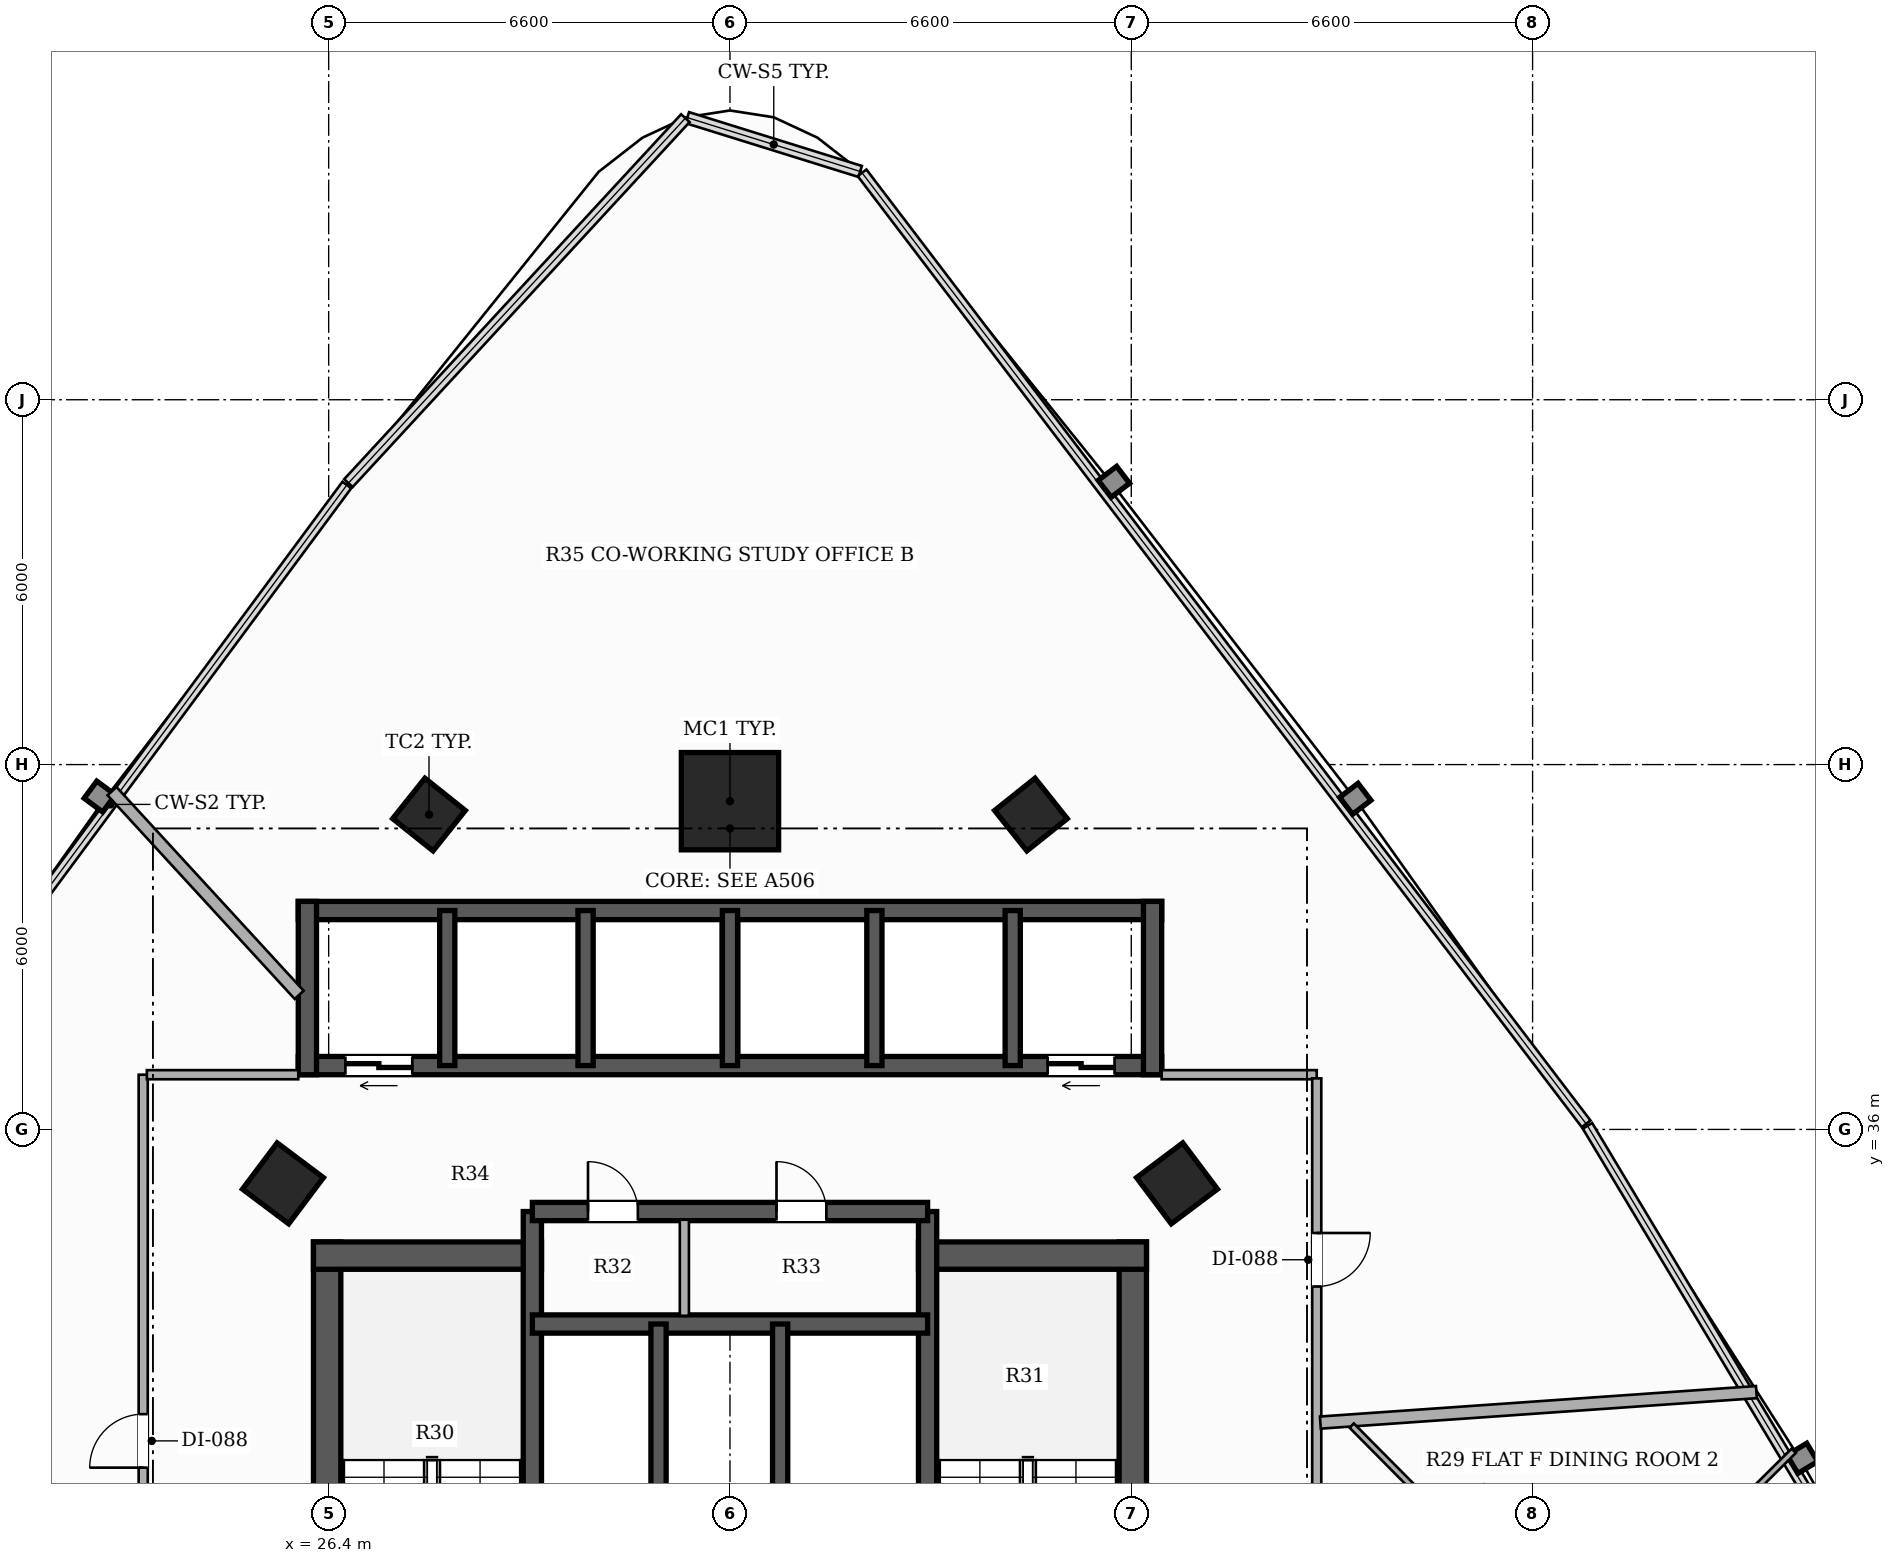
"""IFC4 building model, lengths in metres.
Left out: names, types, materials, properties, quantities, classifications, styles, units other than length and angle.
Written with IfcOpenShell. Run it as: python <this file> out.ifc"""

import sys

from ifc_helpers import new_model, si_unit, direction, frame, frame_2d, origin, origin_2d, place, context, subcontext, project, spatial, rectangle, hollow_rectangle, extrude, element, fill, save


model = new_model("IFC4")
c1 = context("Model", 3, precision=1e-05, world=origin(), true_north=direction((0.0, 1.0)))
c2 = subcontext(c1, "Body", "Model", "MODEL_VIEW")
j1 = project(units=[si_unit("LENGTHUNIT", "METRE"), si_unit("PLANEANGLEUNIT", "RADIAN")], contexts=[c1])
p1 = place(None, origin())
s1 = spatial("IfcSite", under=j1, at=p1, CompositionType="ELEMENT")
p2 = place(p1, origin())
s2 = spatial("IfcBuilding", under=s1, at=p2, CompositionType="ELEMENT")
p3 = place(p2, frame((0.0, 0.0, 30.2)))
s3 = spatial("IfcBuildingStorey", under=s2, at=p3, CompositionType="ELEMENT", Elevation=30.2)
p4 = place(p3, frame((26.375, 26.45, 0.0), z_axis=(0.0, 0.0, 1.0), x_axis=(0.0, 1.0, 0.0)))
e1 = element("IfcWall", 1, at=p4, inside=s3, PredefinedType="SHEAR", context=c2, shape_type="SweptSolid", body=[
    extrude(rectangle(XDim=7.7, YDim=0.45, at=frame_2d((3.85, 0.0))), origin(), (0.0, 0.0, 1.0), 3.3),
])
p5 = place(p3, frame((26.15, 33.925, 0.0), z_axis=(0.0, 0.0, 1.0), x_axis=(1.0, 0.0, 0.0)))
e2 = element("IfcWall", 2, at=p5, inside=s3, PredefinedType="SHEAR", context=c2, shape_type="SweptSolid", body=[
    extrude(rectangle(XDim=3.75, YDim=0.45, at=frame_2d((1.875, 0.0))), origin(), (0.0, 0.0, 1.0), 3.3),
])
p6 = place(p3, frame((39.625, 26.45, 0.0), z_axis=(0.0, 0.0, 1.0), x_axis=(0.0, 1.0, 0.0)))
e3 = element("IfcWall", 3, at=p6, inside=s3, PredefinedType="SHEAR", context=c2, shape_type="SweptSolid", body=[
    extrude(rectangle(XDim=7.7, YDim=0.45, at=frame_2d((3.85, 0.0))), origin(), (0.0, 0.0, 1.0), 3.3),
])
p7 = place(p3, frame((36.1, 33.925, 0.0), z_axis=(0.0, 0.0, 1.0), x_axis=(1.0, 0.0, 0.0)))
e4 = element("IfcWall", 4, at=p7, inside=s3, PredefinedType="SHEAR", context=c2, shape_type="SweptSolid", body=[
    extrude(rectangle(XDim=3.75, YDim=0.45, at=frame_2d((1.875, 0.0))), origin(), (0.0, 0.0, 1.0), 3.3),
])
p8 = place(p3, frame((29.75, 26.45, 0.0), z_axis=(0.0, 0.0, 1.0), x_axis=(0.0, 1.0, 0.0)))
e5 = element("IfcWall", 5, at=p8, inside=s3, PredefinedType="SHEAR", context=c2, shape_type="SweptSolid", body=[
    extrude(rectangle(XDim=8.2, YDim=0.3, at=frame_2d((4.1, 0.0))), origin(), (0.0, 0.0, 1.0), 3.3),
])
p9 = place(p8, frame((0.6, 0.0, 0.0)))
e6 = element("IfcOpeningElement", 6, at=p9, cuts=e5, PredefinedType="OPENING", context=c2, shape_type="SweptSolid", body=[
    extrude(rectangle(XDim=1.05, YDim=2.15, at=frame_2d((0.525, 1.075))), frame((0.0, 0.16, 0.0), z_axis=(0.0, -1.0, 0.0), x_axis=(1.0, 0.0, 0.0)), (0.0, 0.0, 1.0), 0.32),
])
p10 = place(p3, frame((36.25, 26.45, 0.0), z_axis=(0.0, 0.0, 1.0), x_axis=(0.0, 1.0, 0.0)))
e7 = element("IfcWall", 7, at=p10, inside=s3, PredefinedType="SHEAR", context=c2, shape_type="SweptSolid", body=[
    extrude(rectangle(XDim=8.2, YDim=0.3, at=frame_2d((4.1, 0.0))), origin(), (0.0, 0.0, 1.0), 3.3),
])
p11 = place(p10, frame((0.6, 0.0, 0.0)))
e8 = element("IfcOpeningElement", 8, at=p11, cuts=e7, PredefinedType="OPENING", context=c2, shape_type="SweptSolid", body=[
    extrude(rectangle(XDim=1.05, YDim=2.15, at=frame_2d((0.525, 1.075))), frame((0.0, 0.16, 0.0), z_axis=(0.0, -1.0, 0.0), x_axis=(1.0, 0.0, 0.0)), (0.0, 0.0, 1.0), 0.32),
])
p12 = place(p3, frame((29.75, 32.8, 0.0), z_axis=(0.0, 0.0, 1.0), x_axis=(1.0, 0.0, 0.0)))
e9 = element("IfcWall", 9, at=p12, inside=s3, PredefinedType="SHEAR", context=c2, shape_type="SweptSolid", body=[
    extrude(rectangle(XDim=6.5, YDim=0.3, at=frame_2d((3.25, 0.0))), origin(), (0.0, 0.0, 1.0), 3.3),
])
for number, where, z_axis, x_axis in (
    (10, (31.825, 29.9, 0.0), (0.0, 0.0, 1.0), (0.0, 1.0, 0.0)),
    (11, (33.825, 29.9, 0.0), (0.0, 0.0, 1.0), (0.0, 1.0, 0.0)),
):
    element("IfcWall", number, at=place(p3, frame(where, z_axis=z_axis, x_axis=x_axis)), inside=s3, PredefinedType="SHEAR", context=c2, shape_type="SweptSolid", body=[
        extrude(rectangle(XDim=2.9, YDim=0.25, at=frame_2d((1.45, 0.0))), origin(), (0.0, 0.0, 1.0), 3.3),
    ])
p13 = place(p3, frame((29.75, 34.65, 0.0), z_axis=(0.0, 0.0, 1.0), x_axis=(1.0, 0.0, 0.0)))
e12 = element("IfcWall", 12, at=p13, inside=s3, PredefinedType="SHEAR", context=c2, shape_type="SweptSolid", body=[
    extrude(rectangle(XDim=6.5, YDim=0.3, at=frame_2d((3.25, 0.0))), origin(), (0.0, 0.0, 1.0), 3.3),
])
p14 = place(p13, frame((0.915, 0.0, 0.0)))
e13 = element("IfcOpeningElement", 13, at=p14, cuts=e12, PredefinedType="OPENING", context=c2, shape_type="SweptSolid", body=[
    extrude(rectangle(XDim=0.82, YDim=2.1, at=frame_2d((0.41, 1.05))), frame((0.0, 0.16, 0.0), z_axis=(0.0, -1.0, 0.0), x_axis=(1.0, 0.0, 0.0)), (0.0, 0.0, 1.0), 0.32),
])
p15 = place(p13, frame((4.015, 0.0, 0.0)))
e14 = element("IfcOpeningElement", 14, at=p15, cuts=e12, PredefinedType="OPENING", context=c2, shape_type="SweptSolid", body=[
    extrude(rectangle(XDim=0.82, YDim=2.1, at=frame_2d((0.41, 1.05))), frame((0.0, 0.16, 0.0), z_axis=(0.0, -1.0, 0.0), x_axis=(1.0, 0.0, 0.0)), (0.0, 0.0, 1.0), 0.32),
])
p16 = place(p3, frame((40.1, 37.05, 0.0), z_axis=(0.0, 0.0, 1.0), x_axis=(-1.0, 0.0, 0.0)))
e15 = element("IfcWall", 15, at=p16, inside=s3, PredefinedType="SHEAR", context=c2, shape_type="SweptSolid", body=[
    extrude(rectangle(XDim=14.2, YDim=0.3, at=frame_2d((7.1, 0.0))), origin(), (0.0, 0.0, 1.0), 3.3),
])
p17 = place(p16, frame((12.325, 0.0, 0.0)))
e16 = element("IfcOpeningElement", 16, at=p17, cuts=e15, PredefinedType="OPENING", context=c2, shape_type="SweptSolid", body=[
    extrude(rectangle(XDim=1.1, YDim=2.2, at=frame_2d((0.55, 1.1))), frame((0.0, 0.16, 0.0), z_axis=(0.0, -1.0, 0.0), x_axis=(1.0, 0.0, 0.0)), (0.0, 0.0, 1.0), 0.32),
])
p18 = place(p16, frame((0.775, 0.0, 0.0)))
e17 = element("IfcOpeningElement", 17, at=p18, cuts=e15, PredefinedType="OPENING", context=c2, shape_type="SweptSolid", body=[
    extrude(rectangle(XDim=1.1, YDim=2.2, at=frame_2d((0.55, 1.1))), frame((0.0, 0.16, 0.0), z_axis=(0.0, -1.0, 0.0), x_axis=(1.0, 0.0, 0.0)), (0.0, 0.0, 1.0), 0.32),
])
p19 = place(p3, frame((25.9, 39.6, 0.0), z_axis=(0.0, 0.0, 1.0), x_axis=(1.0, 0.0, 0.0)))
e18 = element("IfcWall", 18, at=p19, inside=s3, PredefinedType="SHEAR", context=c2, shape_type="SweptSolid", body=[
    extrude(rectangle(XDim=14.2, YDim=0.3, at=frame_2d((7.1, 0.0))), origin(), (0.0, 0.0, 1.0), 3.3),
])
for number, where, z_axis, x_axis in (
    (19, (26.05, 36.9, 0.0), (0.0, 0.0, 1.0), (0.0, 1.0, 0.0)),
    (20, (39.95, 36.9, 0.0), (0.0, 0.0, 1.0), (0.0, 1.0, 0.0)),
):
    element("IfcWall", number, at=place(p3, frame(where, z_axis=z_axis, x_axis=x_axis)), inside=s3, PredefinedType="SHEAR", context=c2, shape_type="SweptSolid", body=[
        extrude(rectangle(XDim=2.85, YDim=0.3, at=frame_2d((1.425, 0.0))), origin(), (0.0, 0.0, 1.0), 3.3),
    ])
for number, where, z_axis, x_axis in (
    (21, (28.35, 37.05, 0.0), (0.0, 0.0, 1.0), (0.0, 1.0, 0.0)),
    (22, (30.625, 37.05, 0.0), (0.0, 0.0, 1.0), (0.0, 1.0, 0.0)),
    (23, (33.0, 37.05, 0.0), (0.0, 0.0, 1.0), (0.0, 1.0, 0.0)),
    (24, (35.375, 37.05, 0.0), (0.0, 0.0, 1.0), (0.0, 1.0, 0.0)),
    (25, (37.65, 37.05, 0.0), (0.0, 0.0, 1.0), (0.0, 1.0, 0.0)),
):
    element("IfcWall", number, at=place(p3, frame(where, z_axis=z_axis, x_axis=x_axis)), inside=s3, PredefinedType="SHEAR", context=c2, shape_type="SweptSolid", body=[
        extrude(rectangle(XDim=2.55, YDim=0.25, at=frame_2d((1.275, 0.0))), origin(), (0.0, 0.0, 1.0), 3.3),
    ])
p20 = place(p3, frame((33.0, 41.398, 0.0), z_axis=(0.0, 0.0, 1.0), x_axis=(1.0, 0.0, 0.0)))
e26 = element("IfcColumn", 26, at=p20, inside=s3, PredefinedType="COLUMN", context=c2, shape_type="SweptSolid", body=[
    extrude(hollow_rectangle(XDim=1.6, YDim=1.6, WallThickness=0.05, at=origin_2d()), origin(), (0.0, 0.0, 1.0), 3.3),
])
for number, where, z_axis, x_axis in (
    (27, (25.648, 35.113, 0.0), (0.0, 0.0, 1.0), (0.6, 0.8, 0.0)),
    (28, (40.352, 35.113, 0.0), (0.0, 0.0, 1.0), (-0.6, 0.8, 0.0)),
):
    element("IfcColumn", number, at=place(p3, frame(where, z_axis=z_axis, x_axis=x_axis)), inside=s3, PredefinedType="COLUMN", context=c2, shape_type="SweptSolid", body=[
        extrude(hollow_rectangle(XDim=0.95, YDim=0.95, WallThickness=0.032, at=origin_2d()), origin(), (0.0, 0.0, 1.0), 3.3),
    ])
for number, where, z_axis, x_axis in (
    (29, (28.05, 41.178, 0.0), (0.0, 0.0, 1.0), (0.624, 0.782, 0.0)),
    (30, (37.95, 41.178, 0.0), (0.0, 0.0, 1.0), (-0.624, 0.782, 0.0)),
):
    element("IfcColumn", number, at=place(p3, frame(where, z_axis=z_axis, x_axis=x_axis)), inside=s3, PredefinedType="COLUMN", context=c2, shape_type="SweptSolid", body=[
        extrude(hollow_rectangle(XDim=0.85, YDim=0.85, WallThickness=0.028, at=origin_2d()), origin(), (0.0, 0.0, 1.0), 3.3),
    ])
p21 = place(p3, frame((32.25, 32.935, 0.0), z_axis=(0.0, 0.0, 1.0), x_axis=(0.0, 1.0, 0.0)))
e31 = element("IfcWall", 31, at=p21, inside=s3, PredefinedType="PARTITIONING", context=c2, shape_type="SweptSolid", body=[
    extrude(rectangle(XDim=1.58, YDim=0.15, at=frame_2d((0.79, 0.0))), origin(), (0.0, 0.0, 1.0), 3.06),
])
p22 = place(p3, frame((40.1, 36.9, 0.0), z_axis=(0.0, 0.0, 1.0), x_axis=(1.0, 0.0, 0.0)))
e32 = element("IfcWall", 32, at=p22, inside=s3, PredefinedType="PARTITIONING", context=c2, shape_type="SweptSolid", body=[
    extrude(rectangle(XDim=2.55, YDim=0.15, at=frame_2d((1.275, 0.0))), origin(), (0.0, 0.0, 1.0), 2.413),
])
p23 = place(p3, frame((42.65, 36.84, 0.0), z_axis=(0.0, 0.0, 1.0), x_axis=(0.0, -1.0, 0.0)))
e33 = element("IfcWall", 33, at=p23, inside=s3, PredefinedType="PARTITIONING", context=c2, shape_type="SweptSolid", body=[
    extrude(rectangle(XDim=25.04, YDim=0.15, at=frame_2d((12.52, 0.0))), origin(), (0.0, 0.0, 1.0), 2.413),
])
p24 = place(p23, frame((2.543, 0.0, 0.0)))
e34 = element("IfcOpeningElement", 34, at=p24, cuts=e33, PredefinedType="OPENING", context=c2, shape_type="SweptSolid", body=[
    extrude(rectangle(XDim=0.88, YDim=2.1, at=frame_2d((0.44, 1.05))), frame((0.0, 0.085, 0.0), z_axis=(0.0, -1.0, 0.0), x_axis=(1.0, 0.0, 0.0)), (0.0, 0.0, 1.0), 0.17),
])
p25 = place(p23, frame((15.79, 0.0, 0.0)))
e35 = element("IfcOpeningElement", 35, at=p25, cuts=e33, PredefinedType="OPENING", context=c2, shape_type="SweptSolid", body=[
    extrude(rectangle(XDim=0.92, YDim=2.15, at=frame_2d((0.46, 1.075))), frame((0.0, 0.085, 0.0), z_axis=(0.0, -1.0, 0.0), x_axis=(1.0, 0.0, 0.0)), (0.0, 0.0, 1.0), 0.17),
])
p26 = place(p23, frame((9.103, 0.0, 0.0)))
e36 = element("IfcOpeningElement", 36, at=p26, cuts=e33, PredefinedType="OPENING", context=c2, shape_type="SweptSolid", body=[
    extrude(rectangle(XDim=0.92, YDim=2.15, at=frame_2d((0.46, 1.075))), frame((0.0, 0.085, 0.0), z_axis=(0.0, -1.0, 0.0), x_axis=(1.0, 0.0, 0.0)), (0.0, 0.0, 1.0), 0.17),
])
p27 = place(p3, frame((23.35, 11.86, 0.0), z_axis=(0.0, 0.0, 1.0), x_axis=(0.0, 1.0, 0.0)))
e37 = element("IfcWall", 37, at=p27, inside=s3, PredefinedType="PARTITIONING", context=c2, shape_type="SweptSolid", body=[
    extrude(rectangle(XDim=25.04, YDim=0.15, at=frame_2d((12.52, 0.0))), origin(), (0.0, 0.0, 1.0), 2.413),
])
p28 = place(p27, frame((9.872, 0.0, 0.0)))
e38 = element("IfcOpeningElement", 38, at=p28, cuts=e37, PredefinedType="OPENING", context=c2, shape_type="SweptSolid", body=[
    extrude(rectangle(XDim=0.92, YDim=2.15, at=frame_2d((0.46, 1.075))), frame((0.0, 0.085, 0.0), z_axis=(0.0, -1.0, 0.0), x_axis=(1.0, 0.0, 0.0)), (0.0, 0.0, 1.0), 0.17),
])
p29 = place(p27, frame((18.578, 0.0, 0.0)))
e39 = element("IfcOpeningElement", 39, at=p29, cuts=e37, PredefinedType="OPENING", context=c2, shape_type="SweptSolid", body=[
    extrude(rectangle(XDim=0.88, YDim=2.1, at=frame_2d((0.44, 1.05))), frame((0.0, 0.085, 0.0), z_axis=(0.0, -1.0, 0.0), x_axis=(1.0, 0.0, 0.0)), (0.0, 0.0, 1.0), 0.17),
])
p30 = place(p3, frame((23.41, 36.9, 0.0), z_axis=(0.0, 0.0, 1.0), x_axis=(1.0, 0.0, 0.0)))
e40 = element("IfcWall", 40, at=p30, inside=s3, PredefinedType="PARTITIONING", context=c2, shape_type="SweptSolid", body=[
    extrude(rectangle(XDim=2.49, YDim=0.15, at=frame_2d((1.245, 0.0))), origin(), (0.0, 0.0, 1.0), 2.413),
])
p31 = place(p3, frame((49.881, 31.68, 0.0), z_axis=(0.0, 0.0, 1.0), x_axis=(-0.997568680722, -0.069690223431, 0.0)))
e41 = element("IfcWall", 41, at=p31, inside=s3, PredefinedType="PARTITIONING", context=c2, shape_type="SweptSolid", body=[
    extrude(rectangle(XDim=7.189, YDim=0.2, at=frame_2d((3.594, 0.0))), origin(), (0.0, 0.0, 1.0), 2.413),
])
p32 = place(p3, frame((25.915, 38.213, 0.0), z_axis=(0.0, 0.0, 1.0), x_axis=(-0.676584398078, 0.736365094418, 0.0)))
e42 = element("IfcWall", 42, at=p32, inside=s3, PredefinedType="PARTITIONING", context=c2, shape_type="SweptSolid", body=[
    extrude(rectangle(XDim=4.55, YDim=0.2, at=frame_2d((2.275, 0.0))), origin(), (0.0, 0.0, 1.0), 2.619),
])
p33 = place(p3, frame((43.225, 31.13, 0.0), z_axis=(0.0, 0.0, 1.0), x_axis=(0.703942028385, -0.710257432677, 0.0)))
e43 = element("IfcWall", 43, at=p33, inside=s3, PredefinedType="PARTITIONING", context=c2, shape_type="SweptSolid", body=[
    extrude(rectangle(XDim=5.412, YDim=0.1, at=frame_2d((2.706, 0.0))), origin(), (0.0, 0.0, 1.0), 2.413),
])
p34 = place(p33, frame((2.216, 0.0, 0.0)))
e44 = element("IfcOpeningElement", 44, at=p34, cuts=e43, PredefinedType="OPENING", context=c2, shape_type="SweptSolid", body=[
    extrude(rectangle(XDim=0.88, YDim=2.1, at=frame_2d((0.44, 1.05))), frame((0.0, 0.06, 0.0), z_axis=(0.0, -1.0, 0.0), x_axis=(1.0, 0.0, 0.0)), (0.0, 0.0, 1.0), 0.12),
])
p35 = place(p3, frame((47.035, 27.286, 0.0), z_axis=(0.0, 0.0, 1.0), x_axis=(0.71028193183, 0.703917308578, 0.0)))
e45 = element("IfcWall", 45, at=p35, inside=s3, PredefinedType="PARTITIONING", context=c2, shape_type="SweptSolid", body=[
    extrude(rectangle(XDim=4.872, YDim=0.1, at=frame_2d((2.436, 0.0))), origin(), (0.0, 0.0, 1.0), 3.06),
])
p36 = place(p17, origin())
e46 = element("IfcDoor", 46, at=p36, inside=s3, OperationType="DOUBLE_DOOR_SLIDING", PredefinedType="DOOR", context=c2, shape_type="SweptSolid", body=[
    extrude(rectangle(XDim=1.1, YDim=2.2, at=frame_2d((0.55, 1.1))), frame((0.0, 0.025, 0.0), z_axis=(0.0, -1.0, 0.0), x_axis=(1.0, 0.0, 0.0)), (0.0, 0.0, 1.0), 0.05),
])
fill(e16, e46)
p37 = place(p18, origin())
e47 = element("IfcDoor", 47, at=p37, inside=s3, OperationType="DOUBLE_DOOR_SLIDING", PredefinedType="DOOR", context=c2, shape_type="SweptSolid", body=[
    extrude(rectangle(XDim=1.1, YDim=2.2, at=frame_2d((0.55, 1.1))), frame((0.0, 0.025, 0.0), z_axis=(0.0, -1.0, 0.0), x_axis=(1.0, 0.0, 0.0)), (0.0, 0.0, 1.0), 0.05),
])
fill(e17, e47)
p38 = place(p14, origin())
e48 = element("IfcDoor", 48, at=p38, inside=s3, OperationType="SINGLE_SWING_LEFT", PredefinedType="DOOR", context=c2, shape_type="SweptSolid", body=[
    extrude(rectangle(XDim=0.82, YDim=2.1, at=frame_2d((0.41, 1.05))), frame((0.0, 0.025, 0.0), z_axis=(0.0, -1.0, 0.0), x_axis=(1.0, 0.0, 0.0)), (0.0, 0.0, 1.0), 0.05),
])
fill(e13, e48)
p39 = place(p15, origin())
e49 = element("IfcDoor", 49, at=p39, inside=s3, OperationType="SINGLE_SWING_LEFT", PredefinedType="DOOR", context=c2, shape_type="SweptSolid", body=[
    extrude(rectangle(XDim=0.82, YDim=2.1, at=frame_2d((0.41, 1.05))), frame((0.0, 0.025, 0.0), z_axis=(0.0, -1.0, 0.0), x_axis=(1.0, 0.0, 0.0)), (0.0, 0.0, 1.0), 0.05),
])
fill(e14, e49)
p40 = place(p24, origin())
e50 = element("IfcDoor", 50, at=p40, inside=s3, OperationType="SINGLE_SWING_LEFT", PredefinedType="DOOR", context=c2, shape_type="SweptSolid", body=[
    extrude(rectangle(XDim=0.88, YDim=2.1, at=frame_2d((0.44, 1.05))), frame((0.0, 0.025, 0.0), z_axis=(0.0, -1.0, 0.0), x_axis=(1.0, 0.0, 0.0)), (0.0, 0.0, 1.0), 0.05),
])
fill(e34, e50)
p41 = place(p29, origin())
e51 = element("IfcDoor", 51, at=p41, inside=s3, OperationType="SINGLE_SWING_LEFT", PredefinedType="DOOR", context=c2, shape_type="SweptSolid", body=[
    extrude(rectangle(XDim=0.88, YDim=2.1, at=frame_2d((0.44, 1.05))), frame((0.0, 0.025, 0.0), z_axis=(0.0, -1.0, 0.0), x_axis=(1.0, 0.0, 0.0)), (0.0, 0.0, 1.0), 0.05),
])
fill(e39, e51)
save(model, sys.argv[1])
